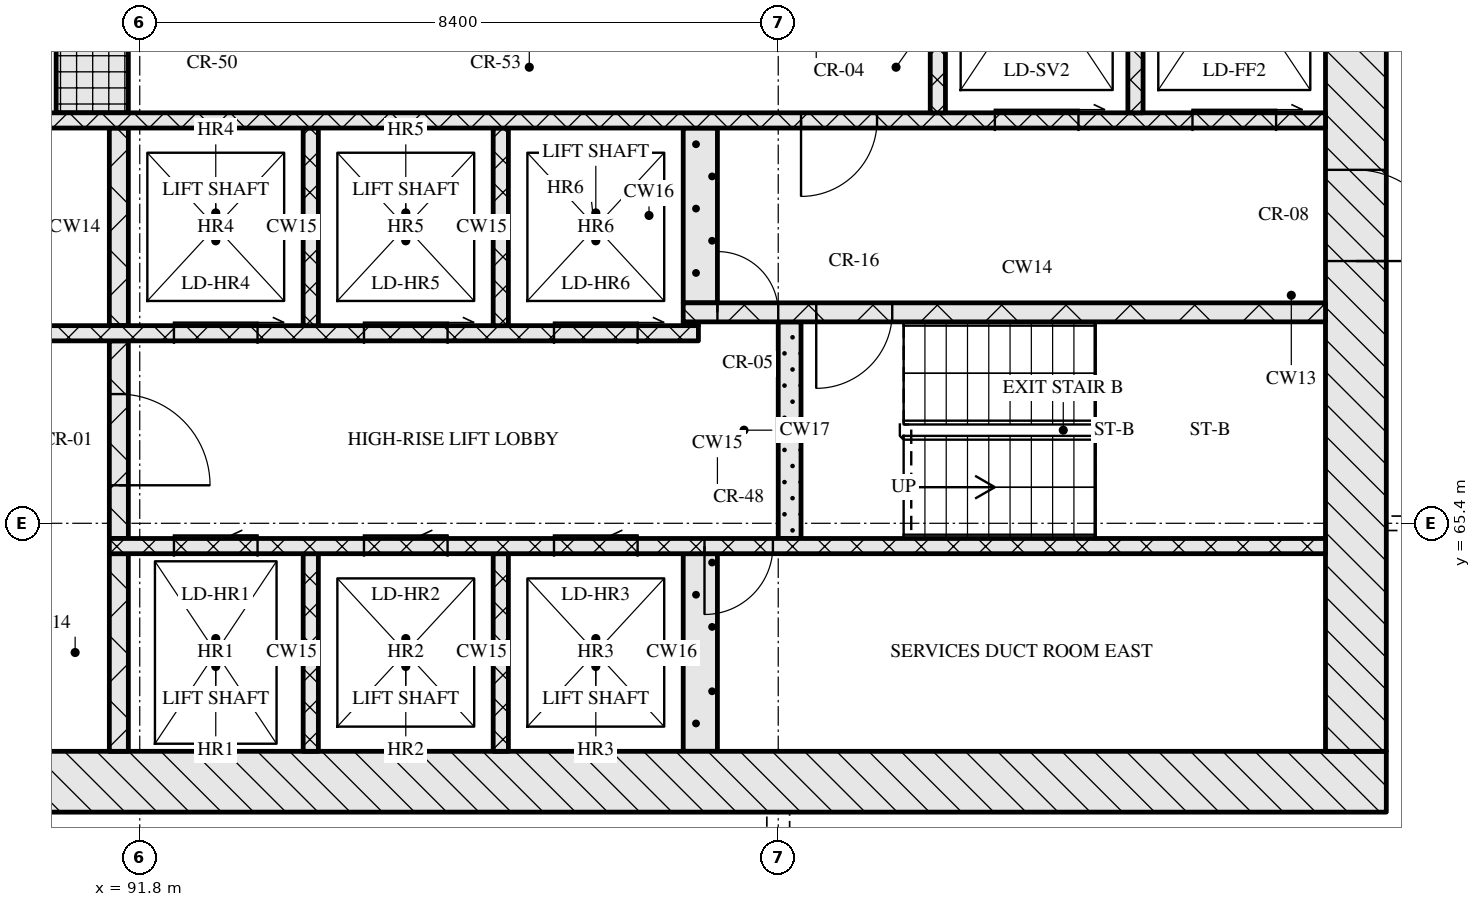
"""IFC4 building model, lengths in metres.
Left out: names, types, materials, properties, quantities, classifications, styles, units other than length and angle.
Written with IfcOpenShell. Run it as: python <this file> out.ifc"""

import sys

from ifc_helpers import new_model, si_unit, direction, frame, frame_2d, origin, place, context, subcontext, project, spatial, rectangle, extrude, element, fill, save


model = new_model("IFC4")
c1 = context("Model", 3, precision=1e-05, world=origin(), true_north=direction((0.0, 1.0)))
c2 = subcontext(c1, "Body", "Model", "MODEL_VIEW")
j1 = project(units=[si_unit("LENGTHUNIT", "METRE"), si_unit("PLANEANGLEUNIT", "RADIAN")], contexts=[c1])
p1 = place(None, origin())
s1 = spatial("IfcSite", under=j1, at=p1, CompositionType="ELEMENT")
p2 = place(p1, origin())
s2 = spatial("IfcBuilding", under=s1, at=p2, CompositionType="ELEMENT")
p3 = place(p2, frame((0.0, 0.0, 161.85)))
s3 = spatial("IfcBuildingStorey", under=s2, at=p3, CompositionType="ELEMENT", Elevation=161.85)
p4 = place(p3, frame((67.0, 62.0, 0.0), z_axis=(0.0, 0.0, 1.0), x_axis=(1.0, 0.0, 0.0)))
e1 = element("IfcWall", 1, at=p4, inside=s3, PredefinedType="SOLIDWALL", context=c2, shape_type="SweptSolid", body=[
    extrude(rectangle(XDim=41.2, YDim=0.8, at=frame_2d((20.6, 0.0))), origin(), (0.0, 0.0, 1.0), 3.32),
])
p5 = place(p4, frame((20.95, 0.0, 0.0)))
e2 = element("IfcOpeningElement", 2, at=p5, cuts=e1, PredefinedType="OPENING", context=c2, shape_type="SweptSolid", body=[
    extrude(rectangle(XDim=1.8, YDim=2.1, at=frame_2d((0.9, 1.05))), frame((0.0, 0.41, 0.0), z_axis=(0.0, -1.0, 0.0), x_axis=(1.0, 0.0, 0.0)), (0.0, 0.0, 1.0), 0.82),
])
p6 = place(p3, frame((107.8, 62.4, 0.0), z_axis=(0.0, 0.0, 1.0), x_axis=(0.0, 1.0, 0.0)))
e3 = element("IfcWall", 3, at=p6, inside=s3, PredefinedType="SOLIDWALL", context=c2, shape_type="SweptSolid", body=[
    extrude(rectangle(XDim=12.0, YDim=0.8, at=frame_2d((6.0, 0.0))), origin(), (0.0, 0.0, 1.0), 3.32),
])
p7 = place(p6, frame((6.45, 0.0, 0.0)))
e4 = element("IfcOpeningElement", 4, at=p7, cuts=e3, PredefinedType="OPENING", context=c2, shape_type="SweptSolid", body=[
    extrude(rectangle(XDim=1.2, YDim=2.1, at=frame_2d((0.6, 1.05))), frame((0.0, 0.41, 0.0), z_axis=(0.0, -1.0, 0.0), x_axis=(1.0, 0.0, 0.0)), (0.0, 0.0, 1.0), 0.82),
])
p8 = place(p3, frame((91.525, 62.4, 0.0), z_axis=(0.0, 0.0, 1.0), x_axis=(0.0, 1.0, 0.0)))
e5 = element("IfcWall", 5, at=p8, inside=s3, PredefinedType="SOLIDWALL", context=c2, shape_type="SweptSolid", body=[
    extrude(rectangle(XDim=2.6, YDim=0.25, at=frame_2d((1.3, 0.0))), origin(), (0.0, 0.0, 1.0), 3.32),
])
for number, where, z_axis, x_axis in (
    (6, (94.05, 62.4, 0.0), (0.0, 0.0, 1.0), (0.0, 1.0, 0.0)),
    (7, (96.55, 62.4, 0.0), (0.0, 0.0, 1.0), (0.0, 1.0, 0.0)),
):
    element("IfcWall", number, at=place(p3, frame(where, z_axis=z_axis, x_axis=x_axis)), inside=s3, PredefinedType="SOLIDWALL", context=c2, shape_type="SweptSolid", body=[
        extrude(rectangle(XDim=2.6, YDim=0.2, at=frame_2d((1.3, 0.0))), origin(), (0.0, 0.0, 1.0), 3.32),
    ])
p9 = place(p3, frame((99.175, 62.4, 0.0), z_axis=(0.0, 0.0, 1.0), x_axis=(0.0, 1.0, 0.0)))
e8 = element("IfcWall", 8, at=p9, inside=s3, PredefinedType="SOLIDWALL", context=c2, shape_type="SweptSolid", body=[
    extrude(rectangle(XDim=2.6, YDim=0.45, at=frame_2d((1.3, 0.0))), origin(), (0.0, 0.0, 1.0), 3.32),
])
p10 = place(p3, frame((91.4, 65.1, 0.0), z_axis=(0.0, 0.0, 1.0), x_axis=(1.0, 0.0, 0.0)))
e9 = element("IfcWall", 9, at=p10, inside=s3, PredefinedType="SOLIDWALL", context=c2, shape_type="SweptSolid", body=[
    extrude(rectangle(XDim=16.0, YDim=0.2, at=frame_2d((8.0, 0.0))), origin(), (0.0, 0.0, 1.0), 3.32),
])
p11 = place(p10, frame((0.85, 0.0, 0.0)))
e10 = element("IfcOpeningElement", 10, at=p11, cuts=e9, PredefinedType="OPENING", context=c2, shape_type="SweptSolid", body=[
    extrude(rectangle(XDim=1.1, YDim=2.1, at=frame_2d((0.55, 1.05))), frame((0.0, 0.11, 0.0), z_axis=(0.0, -1.0, 0.0), x_axis=(1.0, 0.0, 0.0)), (0.0, 0.0, 1.0), 0.22),
])
p12 = place(p10, frame((3.35, 0.0, 0.0)))
e11 = element("IfcOpeningElement", 11, at=p12, cuts=e9, PredefinedType="OPENING", context=c2, shape_type="SweptSolid", body=[
    extrude(rectangle(XDim=1.1, YDim=2.1, at=frame_2d((0.55, 1.05))), frame((0.0, 0.11, 0.0), z_axis=(0.0, -1.0, 0.0), x_axis=(1.0, 0.0, 0.0)), (0.0, 0.0, 1.0), 0.22),
])
p13 = place(p10, frame((5.85, 0.0, 0.0)))
e12 = element("IfcOpeningElement", 12, at=p13, cuts=e9, PredefinedType="OPENING", context=c2, shape_type="SweptSolid", body=[
    extrude(rectangle(XDim=1.1, YDim=2.1, at=frame_2d((0.55, 1.05))), frame((0.0, 0.11, 0.0), z_axis=(0.0, -1.0, 0.0), x_axis=(1.0, 0.0, 0.0)), (0.0, 0.0, 1.0), 0.22),
])
p14 = place(p10, frame((7.83, 0.0, 0.0)))
e13 = element("IfcOpeningElement", 13, at=p14, cuts=e9, PredefinedType="OPENING", context=c2, shape_type="SweptSolid", body=[
    extrude(rectangle(XDim=0.9, YDim=2.1, at=frame_2d((0.45, 1.05))), frame((0.0, 0.11, 0.0), z_axis=(0.0, -1.0, 0.0), x_axis=(1.0, 0.0, 0.0)), (0.0, 0.0, 1.0), 0.22),
])
p15 = place(p3, frame((91.525, 65.2, 0.0), z_axis=(0.0, 0.0, 1.0), x_axis=(0.0, 1.0, 0.0)))
e14 = element("IfcWall", 14, at=p15, inside=s3, PredefinedType="SOLIDWALL", context=c2, shape_type="SweptSolid", body=[
    extrude(rectangle(XDim=2.6, YDim=0.25, at=frame_2d((1.3, 0.0))), origin(), (0.0, 0.0, 1.0), 3.32),
])
p16 = place(p15, frame((0.7, 0.0, 0.0)))
e15 = element("IfcOpeningElement", 15, at=p16, cuts=e14, PredefinedType="OPENING", context=c2, shape_type="SweptSolid", body=[
    extrude(rectangle(XDim=1.2, YDim=2.1, at=frame_2d((0.6, 1.05))), frame((0.0, 0.135, 0.0), z_axis=(0.0, -1.0, 0.0), x_axis=(1.0, 0.0, 0.0)), (0.0, 0.0, 1.0), 0.27),
])
p17 = place(p3, frame((100.35, 65.2, 0.0), z_axis=(0.0, 0.0, 1.0), x_axis=(0.0, 1.0, 0.0)))
e16 = element("IfcWall", 16, at=p17, inside=s3, PredefinedType="SOLIDWALL", context=c2, shape_type="SweptSolid", body=[
    extrude(rectangle(XDim=2.85, YDim=0.3, at=frame_2d((1.425, 0.0))), origin(), (0.0, 0.0, 1.0), 3.32),
])
p18 = place(p3, frame((76.05, 67.9, 0.0), z_axis=(0.0, 0.0, 1.0), x_axis=(1.0, 0.0, 0.0)))
e17 = element("IfcWall", 17, at=p18, inside=s3, PredefinedType="SOLIDWALL", context=c2, shape_type="SweptSolid", body=[
    extrude(rectangle(XDim=23.1, YDim=0.2, at=frame_2d((11.55, 0.0))), origin(), (0.0, 0.0, 1.0), 3.32),
])
p19 = place(p18, frame((3.2, 0.0, 0.0)))
e18 = element("IfcOpeningElement", 18, at=p19, cuts=e17, PredefinedType="OPENING", context=c2, shape_type="SweptSolid", body=[
    extrude(rectangle(XDim=0.9, YDim=2.1, at=frame_2d((0.45, 1.05))), frame((0.0, 0.11, 0.0), z_axis=(0.0, -1.0, 0.0), x_axis=(1.0, 0.0, 0.0)), (0.0, 0.0, 1.0), 0.22),
])
p20 = place(p18, frame((9.7, 0.0, 0.0)))
e19 = element("IfcOpeningElement", 19, at=p20, cuts=e17, PredefinedType="OPENING", context=c2, shape_type="SweptSolid", body=[
    extrude(rectangle(XDim=0.9, YDim=2.1, at=frame_2d((0.45, 1.05))), frame((0.0, 0.11, 0.0), z_axis=(0.0, -1.0, 0.0), x_axis=(1.0, 0.0, 0.0)), (0.0, 0.0, 1.0), 0.22),
])
p21 = place(p18, frame((13.55, 0.0, 0.0)))
e20 = element("IfcOpeningElement", 20, at=p21, cuts=e17, PredefinedType="OPENING", context=c2, shape_type="SweptSolid", body=[
    extrude(rectangle(XDim=1.0, YDim=2.1, at=frame_2d((0.5, 1.05))), frame((0.0, 0.11, 0.0), z_axis=(0.0, -1.0, 0.0), x_axis=(1.0, 0.0, 0.0)), (0.0, 0.0, 1.0), 0.22),
])
p22 = place(p18, frame((16.2, 0.0, 0.0)))
e21 = element("IfcOpeningElement", 21, at=p22, cuts=e17, PredefinedType="OPENING", context=c2, shape_type="SweptSolid", body=[
    extrude(rectangle(XDim=1.1, YDim=2.1, at=frame_2d((0.55, 1.05))), frame((0.0, 0.11, 0.0), z_axis=(0.0, -1.0, 0.0), x_axis=(1.0, 0.0, 0.0)), (0.0, 0.0, 1.0), 0.22),
])
p23 = place(p18, frame((18.7, 0.0, 0.0)))
e22 = element("IfcOpeningElement", 22, at=p23, cuts=e17, PredefinedType="OPENING", context=c2, shape_type="SweptSolid", body=[
    extrude(rectangle(XDim=1.1, YDim=2.1, at=frame_2d((0.55, 1.05))), frame((0.0, 0.11, 0.0), z_axis=(0.0, -1.0, 0.0), x_axis=(1.0, 0.0, 0.0)), (0.0, 0.0, 1.0), 0.22),
])
p24 = place(p18, frame((21.2, 0.0, 0.0)))
e23 = element("IfcOpeningElement", 23, at=p24, cuts=e17, PredefinedType="OPENING", context=c2, shape_type="SweptSolid", body=[
    extrude(rectangle(XDim=1.1, YDim=2.1, at=frame_2d((0.55, 1.05))), frame((0.0, 0.11, 0.0), z_axis=(0.0, -1.0, 0.0), x_axis=(1.0, 0.0, 0.0)), (0.0, 0.0, 1.0), 0.22),
])
p25 = place(p3, frame((91.525, 68.0, 0.0), z_axis=(0.0, 0.0, 1.0), x_axis=(0.0, 1.0, 0.0)))
e24 = element("IfcWall", 24, at=p25, inside=s3, PredefinedType="SOLIDWALL", context=c2, shape_type="SweptSolid", body=[
    extrude(rectangle(XDim=2.6, YDim=0.25, at=frame_2d((1.3, 0.0))), origin(), (0.0, 0.0, 1.0), 3.32),
])
for number, where, z_axis, x_axis in (
    (25, (94.05, 68.0, 0.0), (0.0, 0.0, 1.0), (0.0, 1.0, 0.0)),
    (26, (96.55, 68.0, 0.0), (0.0, 0.0, 1.0), (0.0, 1.0, 0.0)),
):
    element("IfcWall", number, at=place(p3, frame(where, z_axis=z_axis, x_axis=x_axis)), inside=s3, PredefinedType="SOLIDWALL", context=c2, shape_type="SweptSolid", body=[
        extrude(rectangle(XDim=2.6, YDim=0.2, at=frame_2d((1.3, 0.0))), origin(), (0.0, 0.0, 1.0), 3.32),
    ])
p26 = place(p3, frame((98.95, 68.025, 0.0), z_axis=(0.0, 0.0, 1.0), x_axis=(1.0, 0.0, 0.0)))
e27 = element("IfcWall", 27, at=p26, inside=s3, PredefinedType="SOLIDWALL", context=c2, shape_type="SweptSolid", body=[
    extrude(rectangle(XDim=0.2, YDim=0.05, at=frame_2d((0.1, 0.0))), origin(), (0.0, 0.0, 1.0), 3.32),
])
p27 = place(p3, frame((98.95, 68.175, 0.0), z_axis=(0.0, 0.0, 1.0), x_axis=(1.0, 0.0, 0.0)))
e28 = element("IfcWall", 28, at=p27, inside=s3, PredefinedType="SOLIDWALL", context=c2, shape_type="SweptSolid", body=[
    extrude(rectangle(XDim=8.45, YDim=0.25, at=frame_2d((4.225, 0.0))), origin(), (0.0, 0.0, 1.0), 3.32),
])
p28 = place(p27, frame((0.45, 0.0, 0.0)))
e29 = element("IfcOpeningElement", 29, at=p28, cuts=e28, PredefinedType="OPENING", context=c2, shape_type="SweptSolid", body=[
    extrude(rectangle(XDim=0.8, YDim=2.1, at=frame_2d((0.4, 1.05))), frame((0.0, 0.135, 0.0), z_axis=(0.0, -1.0, 0.0), x_axis=(1.0, 0.0, 0.0)), (0.0, 0.0, 1.0), 0.27),
])
p29 = place(p27, frame((1.75, 0.0, 0.0)))
e30 = element("IfcOpeningElement", 30, at=p29, cuts=e28, PredefinedType="OPENING", context=c2, shape_type="SweptSolid", body=[
    extrude(rectangle(XDim=1.0, YDim=2.1, at=frame_2d((0.5, 1.05))), frame((0.0, 0.135, 0.0), z_axis=(0.0, -1.0, 0.0), x_axis=(1.0, 0.0, 0.0)), (0.0, 0.0, 1.0), 0.27),
])
p30 = place(p3, frame((99.175, 68.3, 0.0), z_axis=(0.0, 0.0, 1.0), x_axis=(0.0, 1.0, 0.0)))
e31 = element("IfcWall", 31, at=p30, inside=s3, PredefinedType="SOLIDWALL", context=c2, shape_type="SweptSolid", body=[
    extrude(rectangle(XDim=2.3, YDim=0.45, at=frame_2d((1.15, 0.0))), origin(), (0.0, 0.0, 1.0), 3.32),
])
p31 = place(p3, frame((67.8, 70.7, 0.0), z_axis=(0.0, 0.0, 1.0), x_axis=(1.0, 0.0, 0.0)))
e32 = element("IfcWall", 32, at=p31, inside=s3, PredefinedType="SOLIDWALL", context=c2, shape_type="SweptSolid", body=[
    extrude(rectangle(XDim=39.6, YDim=0.2, at=frame_2d((19.8, 0.0))), origin(), (0.0, 0.0, 1.0), 3.32),
])
p32 = place(p31, frame((0.65, 0.0, 0.0)))
e33 = element("IfcOpeningElement", 33, at=p32, cuts=e32, PredefinedType="OPENING", context=c2, shape_type="SweptSolid", body=[
    extrude(rectangle(XDim=1.1, YDim=2.1, at=frame_2d((0.55, 1.05))), frame((0.0, 0.11, 0.0), z_axis=(0.0, -1.0, 0.0), x_axis=(1.0, 0.0, 0.0)), (0.0, 0.0, 1.0), 0.22),
])
p33 = place(p31, frame((3.25, 0.0, 0.0)))
e34 = element("IfcOpeningElement", 34, at=p33, cuts=e32, PredefinedType="OPENING", context=c2, shape_type="SweptSolid", body=[
    extrude(rectangle(XDim=1.1, YDim=2.1, at=frame_2d((0.55, 1.05))), frame((0.0, 0.11, 0.0), z_axis=(0.0, -1.0, 0.0), x_axis=(1.0, 0.0, 0.0)), (0.0, 0.0, 1.0), 0.22),
])
p34 = place(p31, frame((5.9, 0.0, 0.0)))
e35 = element("IfcOpeningElement", 35, at=p34, cuts=e32, PredefinedType="OPENING", context=c2, shape_type="SweptSolid", body=[
    extrude(rectangle(XDim=1.0, YDim=2.1, at=frame_2d((0.5, 1.05))), frame((0.0, 0.11, 0.0), z_axis=(0.0, -1.0, 0.0), x_axis=(1.0, 0.0, 0.0)), (0.0, 0.0, 1.0), 0.22),
])
p35 = place(p31, frame((21.7, 0.0, 0.0)))
e36 = element("IfcOpeningElement", 36, at=p35, cuts=e32, PredefinedType="OPENING", context=c2, shape_type="SweptSolid", body=[
    extrude(rectangle(XDim=1.0, YDim=2.1, at=frame_2d((0.5, 1.05))), frame((0.0, 0.11, 0.0), z_axis=(0.0, -1.0, 0.0), x_axis=(1.0, 0.0, 0.0)), (0.0, 0.0, 1.0), 0.22),
])
p36 = place(p31, frame((32.7, 0.0, 0.0)))
e37 = element("IfcOpeningElement", 37, at=p36, cuts=e32, PredefinedType="OPENING", context=c2, shape_type="SweptSolid", body=[
    extrude(rectangle(XDim=1.0, YDim=2.1, at=frame_2d((0.5, 1.05))), frame((0.0, 0.11, 0.0), z_axis=(0.0, -1.0, 0.0), x_axis=(1.0, 0.0, 0.0)), (0.0, 0.0, 1.0), 0.22),
])
p37 = place(p31, frame((35.25, 0.0, 0.0)))
e38 = element("IfcOpeningElement", 38, at=p37, cuts=e32, PredefinedType="OPENING", context=c2, shape_type="SweptSolid", body=[
    extrude(rectangle(XDim=1.1, YDim=2.1, at=frame_2d((0.55, 1.05))), frame((0.0, 0.11, 0.0), z_axis=(0.0, -1.0, 0.0), x_axis=(1.0, 0.0, 0.0)), (0.0, 0.0, 1.0), 0.22),
])
p38 = place(p31, frame((37.85, 0.0, 0.0)))
e39 = element("IfcOpeningElement", 39, at=p38, cuts=e32, PredefinedType="OPENING", context=c2, shape_type="SweptSolid", body=[
    extrude(rectangle(XDim=1.1, YDim=2.1, at=frame_2d((0.55, 1.05))), frame((0.0, 0.11, 0.0), z_axis=(0.0, -1.0, 0.0), x_axis=(1.0, 0.0, 0.0)), (0.0, 0.0, 1.0), 0.22),
])
p39 = place(p3, frame((91.175, 70.8, 0.0), z_axis=(0.0, 0.0, 1.0), x_axis=(0.0, 1.0, 0.0)))
e40 = element("IfcWall", 40, at=p39, inside=s3, PredefinedType="SOLIDWALL", context=c2, shape_type="SweptSolid", body=[
    extrude(rectangle(XDim=1.2, YDim=0.95, at=frame_2d((0.6, 0.0))), origin(), (0.0, 0.0, 1.0), 3.32),
])
p40 = place(p3, frame((102.3, 70.8, 0.0), z_axis=(0.0, 0.0, 1.0), x_axis=(0.0, 1.0, 0.0)))
e41 = element("IfcWall", 41, at=p40, inside=s3, PredefinedType="SOLIDWALL", context=c2, shape_type="SweptSolid", body=[
    extrude(rectangle(XDim=1.2, YDim=0.2, at=frame_2d((0.6, 0.0))), origin(), (0.0, 0.0, 1.0), 3.32),
])
p41 = place(p3, frame((104.9, 70.8, 0.0), z_axis=(0.0, 0.0, 1.0), x_axis=(0.0, 1.0, 0.0)))
e42 = element("IfcWall", 42, at=p41, inside=s3, PredefinedType="SOLIDWALL", context=c2, shape_type="SweptSolid", body=[
    extrude(rectangle(XDim=3.6, YDim=0.2, at=frame_2d((1.8, 0.0))), origin(), (0.0, 0.0, 1.0), 3.32),
])
p42 = place(p11, origin())
e43 = element("IfcDoor", 43, at=p42, inside=s3, OperationType="SLIDING_TO_LEFT", PredefinedType="DOOR", context=c2, shape_type="SweptSolid", body=[
    extrude(rectangle(XDim=1.1, YDim=2.1, at=frame_2d((0.55, 1.05))), frame((0.0, 0.025, 0.0), z_axis=(0.0, -1.0, 0.0), x_axis=(1.0, 0.0, 0.0)), (0.0, 0.0, 1.0), 0.05),
])
fill(e10, e43)
p43 = place(p12, origin())
e44 = element("IfcDoor", 44, at=p43, inside=s3, OperationType="SLIDING_TO_LEFT", PredefinedType="DOOR", context=c2, shape_type="SweptSolid", body=[
    extrude(rectangle(XDim=1.1, YDim=2.1, at=frame_2d((0.55, 1.05))), frame((0.0, 0.025, 0.0), z_axis=(0.0, -1.0, 0.0), x_axis=(1.0, 0.0, 0.0)), (0.0, 0.0, 1.0), 0.05),
])
fill(e11, e44)
p44 = place(p13, origin())
e45 = element("IfcDoor", 45, at=p44, inside=s3, OperationType="SLIDING_TO_LEFT", PredefinedType="DOOR", context=c2, shape_type="SweptSolid", body=[
    extrude(rectangle(XDim=1.1, YDim=2.1, at=frame_2d((0.55, 1.05))), frame((0.0, 0.025, 0.0), z_axis=(0.0, -1.0, 0.0), x_axis=(1.0, 0.0, 0.0)), (0.0, 0.0, 1.0), 0.05),
])
fill(e12, e45)
p45 = place(p14, origin())
e46 = element("IfcDoor", 46, at=p45, inside=s3, OperationType="SINGLE_SWING_RIGHT", PredefinedType="DOOR", context=c2, shape_type="SweptSolid", body=[
    extrude(rectangle(XDim=0.9, YDim=2.1, at=frame_2d((0.45, 1.05))), frame((0.0, 0.025, 0.0), z_axis=(0.0, -1.0, 0.0), x_axis=(1.0, 0.0, 0.0)), (0.0, 0.0, 1.0), 0.05),
])
fill(e13, e46)
p46 = place(p16, origin())
e47 = element("IfcDoor", 47, at=p46, inside=s3, OperationType="SINGLE_SWING_RIGHT", PredefinedType="DOOR", context=c2, shape_type="SweptSolid", body=[
    extrude(rectangle(XDim=1.2, YDim=2.1, at=frame_2d((0.6, 1.05))), frame((0.0, 0.025, 0.0), z_axis=(0.0, -1.0, 0.0), x_axis=(1.0, 0.0, 0.0)), (0.0, 0.0, 1.0), 0.05),
])
fill(e15, e47)
p47 = place(p22, origin())
e48 = element("IfcDoor", 48, at=p47, inside=s3, OperationType="SLIDING_TO_RIGHT", PredefinedType="DOOR", context=c2, shape_type="SweptSolid", body=[
    extrude(rectangle(XDim=1.1, YDim=2.1, at=frame_2d((0.55, 1.05))), frame((0.0, 0.025, 0.0), z_axis=(0.0, -1.0, 0.0), x_axis=(1.0, 0.0, 0.0)), (0.0, 0.0, 1.0), 0.05),
])
fill(e21, e48)
p48 = place(p23, origin())
e49 = element("IfcDoor", 49, at=p48, inside=s3, OperationType="SLIDING_TO_RIGHT", PredefinedType="DOOR", context=c2, shape_type="SweptSolid", body=[
    extrude(rectangle(XDim=1.1, YDim=2.1, at=frame_2d((0.55, 1.05))), frame((0.0, 0.025, 0.0), z_axis=(0.0, -1.0, 0.0), x_axis=(1.0, 0.0, 0.0)), (0.0, 0.0, 1.0), 0.05),
])
fill(e22, e49)
p49 = place(p24, origin())
e50 = element("IfcDoor", 50, at=p49, inside=s3, OperationType="SLIDING_TO_RIGHT", PredefinedType="DOOR", context=c2, shape_type="SweptSolid", body=[
    extrude(rectangle(XDim=1.1, YDim=2.1, at=frame_2d((0.55, 1.05))), frame((0.0, 0.025, 0.0), z_axis=(0.0, -1.0, 0.0), x_axis=(1.0, 0.0, 0.0)), (0.0, 0.0, 1.0), 0.05),
])
fill(e23, e50)
p50 = place(p28, origin())
e51 = element("IfcDoor", 51, at=p50, inside=s3, OperationType="SINGLE_SWING_LEFT", PredefinedType="DOOR", context=c2, shape_type="SweptSolid", body=[
    extrude(rectangle(XDim=0.8, YDim=2.1, at=frame_2d((0.4, 1.05))), frame((0.0, 0.025, 0.0), z_axis=(0.0, -1.0, 0.0), x_axis=(1.0, 0.0, 0.0)), (0.0, 0.0, 1.0), 0.05),
])
fill(e29, e51)
p51 = place(p29, origin())
e52 = element("IfcDoor", 52, at=p51, inside=s3, OperationType="SINGLE_SWING_RIGHT", PredefinedType="DOOR", context=c2, shape_type="SweptSolid", body=[
    extrude(rectangle(XDim=1.0, YDim=2.1, at=frame_2d((0.5, 1.05))), frame((0.0, 0.025, 0.0), z_axis=(0.0, -1.0, 0.0), x_axis=(1.0, 0.0, 0.0)), (0.0, 0.0, 1.0), 0.05),
])
fill(e30, e52)
p52 = place(p7, origin())
e53 = element("IfcDoor", 53, at=p52, inside=s3, OperationType="SINGLE_SWING_RIGHT", PredefinedType="DOOR", context=c2, shape_type="SweptSolid", body=[
    extrude(rectangle(XDim=1.2, YDim=2.1, at=frame_2d((0.6, 1.05))), frame((0.0, 0.025, 0.0), z_axis=(0.0, -1.0, 0.0), x_axis=(1.0, 0.0, 0.0)), (0.0, 0.0, 1.0), 0.05),
])
fill(e4, e53)
p53 = place(p36, origin())
e54 = element("IfcDoor", 54, at=p53, inside=s3, OperationType="SINGLE_SWING_RIGHT", PredefinedType="DOOR", context=c2, shape_type="SweptSolid", body=[
    extrude(rectangle(XDim=1.0, YDim=2.1, at=frame_2d((0.5, 1.05))), frame((0.0, 0.025, 0.0), z_axis=(0.0, -1.0, 0.0), x_axis=(1.0, 0.0, 0.0)), (0.0, 0.0, 1.0), 0.05),
])
fill(e37, e54)
p54 = place(p37, origin())
e55 = element("IfcDoor", 55, at=p54, inside=s3, OperationType="SLIDING_TO_RIGHT", PredefinedType="DOOR", context=c2, shape_type="SweptSolid", body=[
    extrude(rectangle(XDim=1.1, YDim=2.1, at=frame_2d((0.55, 1.05))), frame((0.0, 0.025, 0.0), z_axis=(0.0, -1.0, 0.0), x_axis=(1.0, 0.0, 0.0)), (0.0, 0.0, 1.0), 0.05),
])
fill(e38, e55)
p55 = place(p38, origin())
e56 = element("IfcDoor", 56, at=p55, inside=s3, OperationType="SLIDING_TO_RIGHT", PredefinedType="DOOR", context=c2, shape_type="SweptSolid", body=[
    extrude(rectangle(XDim=1.1, YDim=2.1, at=frame_2d((0.55, 1.05))), frame((0.0, 0.025, 0.0), z_axis=(0.0, -1.0, 0.0), x_axis=(1.0, 0.0, 0.0)), (0.0, 0.0, 1.0), 0.05),
])
fill(e39, e56)
save(model, sys.argv[1])
